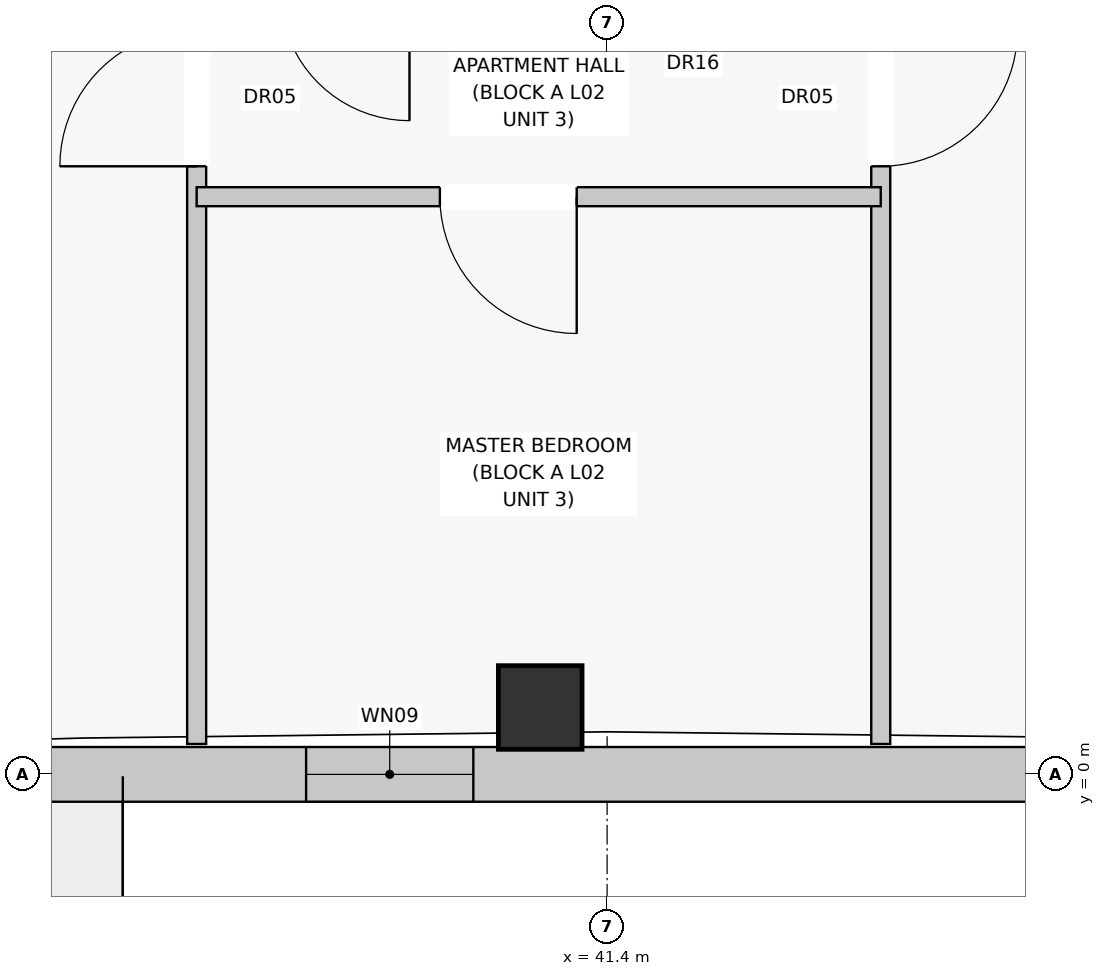
"""IFC4 building model, lengths in metres.
Left out: names, types, materials, properties, quantities, classifications, styles, units other than length and angle.
Written with IfcOpenShell. Run it as: python <this file> out.ifc"""

import sys

from ifc_helpers import new_model, si_unit, direction, frame, frame_2d, origin, origin_with_axes, origin_2d, place, context, subcontext, project, spatial, rectangle, extrude, element, fill, save


model = new_model("IFC4")
c1 = context("Model", 3, precision=1e-05, world=origin(), true_north=direction((0.0, 1.0)))
c2 = subcontext(c1, "Body", "Model", "MODEL_VIEW")
j1 = project(units=[si_unit("LENGTHUNIT", "METRE"), si_unit("PLANEANGLEUNIT", "RADIAN")], contexts=[c1])
p1 = place(None, origin())
s1 = spatial("IfcSite", under=j1, at=p1, CompositionType="ELEMENT")
p2 = place(p1, origin())
s2 = spatial("IfcBuilding", under=s1, at=p2, CompositionType="ELEMENT")
p3 = place(p2, frame((0.0, 0.0, 8.0)))
s3 = spatial("IfcBuildingStorey", under=s2, at=p3, CompositionType="ELEMENT", Elevation=8.0)
p4 = place(p3, frame((40.96, 0.44, 0.0), z_axis=(0.0, 0.0, 1.0), x_axis=(1.0, 0.0, 0.0)))
e1 = element("IfcColumn", 1, at=p4, inside=s3, PredefinedType="COLUMN", context=c2, shape_type="SweptSolid", body=[
    extrude(rectangle(XDim=0.55, YDim=0.55, at=origin_2d()), origin(), (0.0, 0.0, 1.0), 3.2),
])
p5 = place(p3, frame((0.17, 0.0, 0.0), z_axis=(0.0, 0.0, 1.0), x_axis=(1.0, 0.0, 0.0)))
e2 = element("IfcWall", 2, at=p5, inside=s3, PredefinedType="STANDARD", context=c2, shape_type="SweptSolid", body=[
    extrude(rectangle(XDim=54.86, YDim=0.36, at=frame_2d((27.43, 0.0))), origin(), (0.0, 0.0, 1.0), 2.94),
])
p6 = place(p5, frame((3.736, 0.0, 0.0)))
e3 = element("IfcOpeningElement", 3, at=p6, cuts=e2, PredefinedType="OPENING", context=c2, shape_type="SweptSolid", body=[
    extrude(rectangle(XDim=1.05, YDim=2.12, at=frame_2d((0.525, 1.06))), frame((0.0, 0.192, 0.0), z_axis=(0.0, -1.0, 0.0), x_axis=(1.0, 0.0, 0.0)), (0.0, 0.0, 1.0), 0.384),
])
p7 = place(p5, frame((18.636, 0.0, 0.0)))
e4 = element("IfcOpeningElement", 4, at=p7, cuts=e2, PredefinedType="OPENING", context=c2, shape_type="SweptSolid", body=[
    extrude(rectangle(XDim=1.05, YDim=2.12, at=frame_2d((0.525, 1.06))), frame((0.0, 0.192, 0.0), z_axis=(0.0, -1.0, 0.0), x_axis=(1.0, 0.0, 0.0)), (0.0, 0.0, 1.0), 0.384),
])
p8 = place(p5, frame((32.636, 0.0, 0.0)))
e5 = element("IfcOpeningElement", 5, at=p8, cuts=e2, PredefinedType="OPENING", context=c2, shape_type="SweptSolid", body=[
    extrude(rectangle(XDim=1.05, YDim=2.12, at=frame_2d((0.525, 1.06))), frame((0.0, 0.192, 0.0), z_axis=(0.0, -1.0, 0.0), x_axis=(1.0, 0.0, 0.0)), (0.0, 0.0, 1.0), 0.384),
])
p9 = place(p5, frame((46.441, 0.0, 0.0)))
e6 = element("IfcOpeningElement", 6, at=p9, cuts=e2, PredefinedType="OPENING", context=c2, shape_type="SweptSolid", body=[
    extrude(rectangle(XDim=1.05, YDim=2.12, at=frame_2d((0.525, 1.06))), frame((0.0, 0.192, 0.0), z_axis=(0.0, -1.0, 0.0), x_axis=(1.0, 0.0, 0.0)), (0.0, 0.0, 1.0), 0.384),
])
p10 = place(p5, frame((1.95, 0.0, 0.72)))
e7 = element("IfcOpeningElement", 7, at=p10, cuts=e2, PredefinedType="OPENING", context=c2, shape_type="SweptSolid", body=[
    extrude(rectangle(XDim=1.1, YDim=1.5, at=frame_2d((0.55, 0.75))), frame((0.0, 0.192, 0.0), z_axis=(0.0, -1.0, 0.0), x_axis=(1.0, 0.0, 0.0)), (0.0, 0.0, 1.0), 0.384),
])
p11 = place(p5, frame((7.232, 0.0, 0.72)))
e8 = element("IfcOpeningElement", 8, at=p11, cuts=e2, PredefinedType="OPENING", context=c2, shape_type="SweptSolid", body=[
    extrude(rectangle(XDim=1.9, YDim=1.85, at=frame_2d((0.95, 0.925))), frame((0.0, 0.192, 0.0), z_axis=(0.0, -1.0, 0.0), x_axis=(1.0, 0.0, 0.0)), (0.0, 0.0, 1.0), 0.384),
])
p12 = place(p5, frame((10.85, 0.0, 0.72)))
e9 = element("IfcOpeningElement", 9, at=p12, cuts=e2, PredefinedType="OPENING", context=c2, shape_type="SweptSolid", body=[
    extrude(rectangle(XDim=1.1, YDim=1.5, at=frame_2d((0.55, 0.75))), frame((0.0, 0.192, 0.0), z_axis=(0.0, -1.0, 0.0), x_axis=(1.0, 0.0, 0.0)), (0.0, 0.0, 1.0), 0.384),
])
p13 = place(p5, frame((16.25, 0.0, 0.72)))
e10 = element("IfcOpeningElement", 10, at=p13, cuts=e2, PredefinedType="OPENING", context=c2, shape_type="SweptSolid", body=[
    extrude(rectangle(XDim=1.1, YDim=1.5, at=frame_2d((0.55, 0.75))), frame((0.0, 0.192, 0.0), z_axis=(0.0, -1.0, 0.0), x_axis=(1.0, 0.0, 0.0)), (0.0, 0.0, 1.0), 0.384),
])
p14 = place(p5, frame((21.55, 0.0, 0.72)))
e11 = element("IfcOpeningElement", 11, at=p14, cuts=e2, PredefinedType="OPENING", context=c2, shape_type="SweptSolid", body=[
    extrude(rectangle(XDim=1.9, YDim=1.85, at=frame_2d((0.95, 0.925))), frame((0.0, 0.192, 0.0), z_axis=(0.0, -1.0, 0.0), x_axis=(1.0, 0.0, 0.0)), (0.0, 0.0, 1.0), 0.384),
])
p15 = place(p5, frame((28.35, 0.0, 0.72)))
e12 = element("IfcOpeningElement", 12, at=p15, cuts=e2, PredefinedType="OPENING", context=c2, shape_type="SweptSolid", body=[
    extrude(rectangle(XDim=1.1, YDim=1.5, at=frame_2d((0.55, 0.75))), frame((0.0, 0.192, 0.0), z_axis=(0.0, -1.0, 0.0), x_axis=(1.0, 0.0, 0.0)), (0.0, 0.0, 1.0), 0.384),
])
p16 = place(p5, frame((30.8, 0.0, 0.85)))
e13 = element("IfcOpeningElement", 13, at=p16, cuts=e2, PredefinedType="OPENING", context=c2, shape_type="SweptSolid", body=[
    extrude(rectangle(XDim=1.5, YDim=1.65, at=frame_2d((0.75, 0.825))), frame((0.0, 0.192, 0.0), z_axis=(0.0, -1.0, 0.0), x_axis=(1.0, 0.0, 0.0)), (0.0, 0.0, 1.0), 0.384),
])
p17 = place(p5, frame((35.55, 0.0, 0.72)))
e14 = element("IfcOpeningElement", 14, at=p17, cuts=e2, PredefinedType="OPENING", context=c2, shape_type="SweptSolid", body=[
    extrude(rectangle(XDim=1.9, YDim=1.85, at=frame_2d((0.95, 0.925))), frame((0.0, 0.192, 0.0), z_axis=(0.0, -1.0, 0.0), x_axis=(1.0, 0.0, 0.0)), (0.0, 0.0, 1.0), 0.384),
])
p18 = place(p5, frame((39.25, 0.0, 0.72)))
e15 = element("IfcOpeningElement", 15, at=p18, cuts=e2, PredefinedType="OPENING", context=c2, shape_type="SweptSolid", body=[
    extrude(rectangle(XDim=1.1, YDim=1.5, at=frame_2d((0.55, 0.75))), frame((0.0, 0.192, 0.0), z_axis=(0.0, -1.0, 0.0), x_axis=(1.0, 0.0, 0.0)), (0.0, 0.0, 1.0), 0.384),
])
p19 = place(p5, frame((44.3, 0.0, 0.8)))
e16 = element("IfcOpeningElement", 16, at=p19, cuts=e2, PredefinedType="OPENING", context=c2, shape_type="SweptSolid", body=[
    extrude(rectangle(XDim=1.8, YDim=1.7, at=frame_2d((0.9, 0.85))), frame((0.0, 0.192, 0.0), z_axis=(0.0, -1.0, 0.0), x_axis=(1.0, 0.0, 0.0)), (0.0, 0.0, 1.0), 0.384),
])
p20 = place(p5, frame((49.15, 0.0, 0.72)))
e17 = element("IfcOpeningElement", 17, at=p20, cuts=e2, PredefinedType="OPENING", context=c2, shape_type="SweptSolid", body=[
    extrude(rectangle(XDim=1.9, YDim=1.85, at=frame_2d((0.95, 0.925))), frame((0.0, 0.192, 0.0), z_axis=(0.0, -1.0, 0.0), x_axis=(1.0, 0.0, 0.0)), (0.0, 0.0, 1.0), 0.384),
])
p21 = place(p5, frame((52.95, 0.0, 0.72)))
e18 = element("IfcOpeningElement", 18, at=p21, cuts=e2, PredefinedType="OPENING", context=c2, shape_type="SweptSolid", body=[
    extrude(rectangle(XDim=1.1, YDim=1.5, at=frame_2d((0.55, 0.75))), frame((0.0, 0.192, 0.0), z_axis=(0.0, -1.0, 0.0), x_axis=(1.0, 0.0, 0.0)), (0.0, 0.0, 1.0), 0.384),
])
p22 = place(p3, frame((43.2, 7.85, 0.0), z_axis=(0.0, 0.0, 1.0), x_axis=(0.0, -1.0, 0.0)))
e19 = element("IfcWall", 19, at=p22, inside=s3, PredefinedType="PARTITIONING", context=c2, shape_type="SweptSolid", body=[
    extrude(rectangle(XDim=7.65, YDim=0.125, at=frame_2d((3.825, 0.0))), origin(), (0.0, 0.0, 1.0), 2.59),
])
p23 = place(p22, frame((2.95, 0.0, 0.0)))
e20 = element("IfcOpeningElement", 20, at=p23, cuts=e19, PredefinedType="OPENING", context=c2, shape_type="SweptSolid", body=[
    extrude(rectangle(XDim=0.9, YDim=2.1, at=frame_2d((0.45, 1.05))), frame((0.0, 0.074, 0.0), z_axis=(0.0, -1.0, 0.0), x_axis=(1.0, 0.0, 0.0)), (0.0, 0.0, 1.0), 0.149),
])
p24 = place(p3, frame((38.7, 7.85, 0.0), z_axis=(0.0, 0.0, 1.0), x_axis=(0.0, -1.0, 0.0)))
e21 = element("IfcWall", 21, at=p24, inside=s3, PredefinedType="PARTITIONING", context=c2, shape_type="SweptSolid", body=[
    extrude(rectangle(XDim=7.65, YDim=0.125, at=frame_2d((3.825, 0.0))), origin(), (0.0, 0.0, 1.0), 2.94),
])
p25 = place(p24, frame((2.95, 0.0, 0.0)))
e22 = element("IfcOpeningElement", 22, at=p25, cuts=e21, PredefinedType="OPENING", context=c2, shape_type="SweptSolid", body=[
    extrude(rectangle(XDim=0.9, YDim=2.1, at=frame_2d((0.45, 1.05))), frame((0.0, 0.074, 0.0), z_axis=(0.0, -1.0, 0.0), x_axis=(1.0, 0.0, 0.0)), (0.0, 0.0, 1.0), 0.149),
])
p26 = place(p3, frame((38.7, 3.8, 0.0), z_axis=(0.0, 0.0, 1.0), x_axis=(1.0, 0.0, 0.0)))
e23 = element("IfcWall", 23, at=p26, inside=s3, PredefinedType="PARTITIONING", context=c2, shape_type="SweptSolid", body=[
    extrude(rectangle(XDim=4.5, YDim=0.125, at=frame_2d((2.25, 0.0))), origin(), (0.0, 0.0, 1.0), 2.94),
])
p27 = place(p26, frame((1.6, 0.0, 0.0)))
e24 = element("IfcOpeningElement", 24, at=p27, cuts=e23, PredefinedType="OPENING", context=c2, shape_type="SweptSolid", body=[
    extrude(rectangle(XDim=0.9, YDim=2.1, at=frame_2d((0.45, 1.05))), frame((0.0, 0.074, 0.0), z_axis=(0.0, -1.0, 0.0), x_axis=(1.0, 0.0, 0.0)), (0.0, 0.0, 1.0), 0.149),
])
p28 = place(p18, origin_with_axes())
e25 = element("IfcWindow", 25, at=p28, inside=s3, PartitioningType="SINGLE_PANEL", PredefinedType="WINDOW", context=c2, shape_type="SweptSolid", body=[
    extrude(rectangle(XDim=1.1, YDim=1.5, at=frame_2d((0.55, 0.75))), frame((0.0, 0.03, 0.0), z_axis=(0.0, -1.0, 0.0), x_axis=(1.0, 0.0, 0.0)), (0.0, 0.0, 1.0), 0.06),
])
fill(e15, e25)
p29 = place(p23, origin_with_axes())
e26 = element("IfcDoor", 26, at=p29, inside=s3, OperationType="SINGLE_SWING_LEFT", PredefinedType="DOOR", context=c2, shape_type="SweptSolid", body=[
    extrude(rectangle(XDim=0.9, YDim=2.1, at=frame_2d((0.45, 1.05))), frame((0.0, 0.025, 0.0), z_axis=(0.0, -1.0, 0.0), x_axis=(1.0, 0.0, 0.0)), (0.0, 0.0, 1.0), 0.05),
])
fill(e20, e26)
p30 = place(p25, frame((0.9, 0.0, 0.0), z_axis=(0.0, 0.0, 1.0), x_axis=(-1.0, 0.0, 0.0)))
e27 = element("IfcDoor", 27, at=p30, inside=s3, OperationType="SINGLE_SWING_RIGHT", PredefinedType="DOOR", context=c2, shape_type="SweptSolid", body=[
    extrude(rectangle(XDim=0.9, YDim=2.1, at=frame_2d((0.45, 1.05))), frame((0.0, 0.025, 0.0), z_axis=(0.0, -1.0, 0.0), x_axis=(1.0, 0.0, 0.0)), (0.0, 0.0, 1.0), 0.05),
])
fill(e22, e27)
p31 = place(p27, frame((0.9, 0.0, 0.0), z_axis=(0.0, 0.0, 1.0), x_axis=(-1.0, 0.0, 0.0)))
e28 = element("IfcDoor", 28, at=p31, inside=s3, OperationType="SINGLE_SWING_RIGHT", PredefinedType="DOOR", context=c2, shape_type="SweptSolid", body=[
    extrude(rectangle(XDim=0.9, YDim=2.1, at=frame_2d((0.45, 1.05))), frame((0.0, 0.025, 0.0), z_axis=(0.0, -1.0, 0.0), x_axis=(1.0, 0.0, 0.0)), (0.0, 0.0, 1.0), 0.05),
])
fill(e24, e28)
save(model, sys.argv[1])
